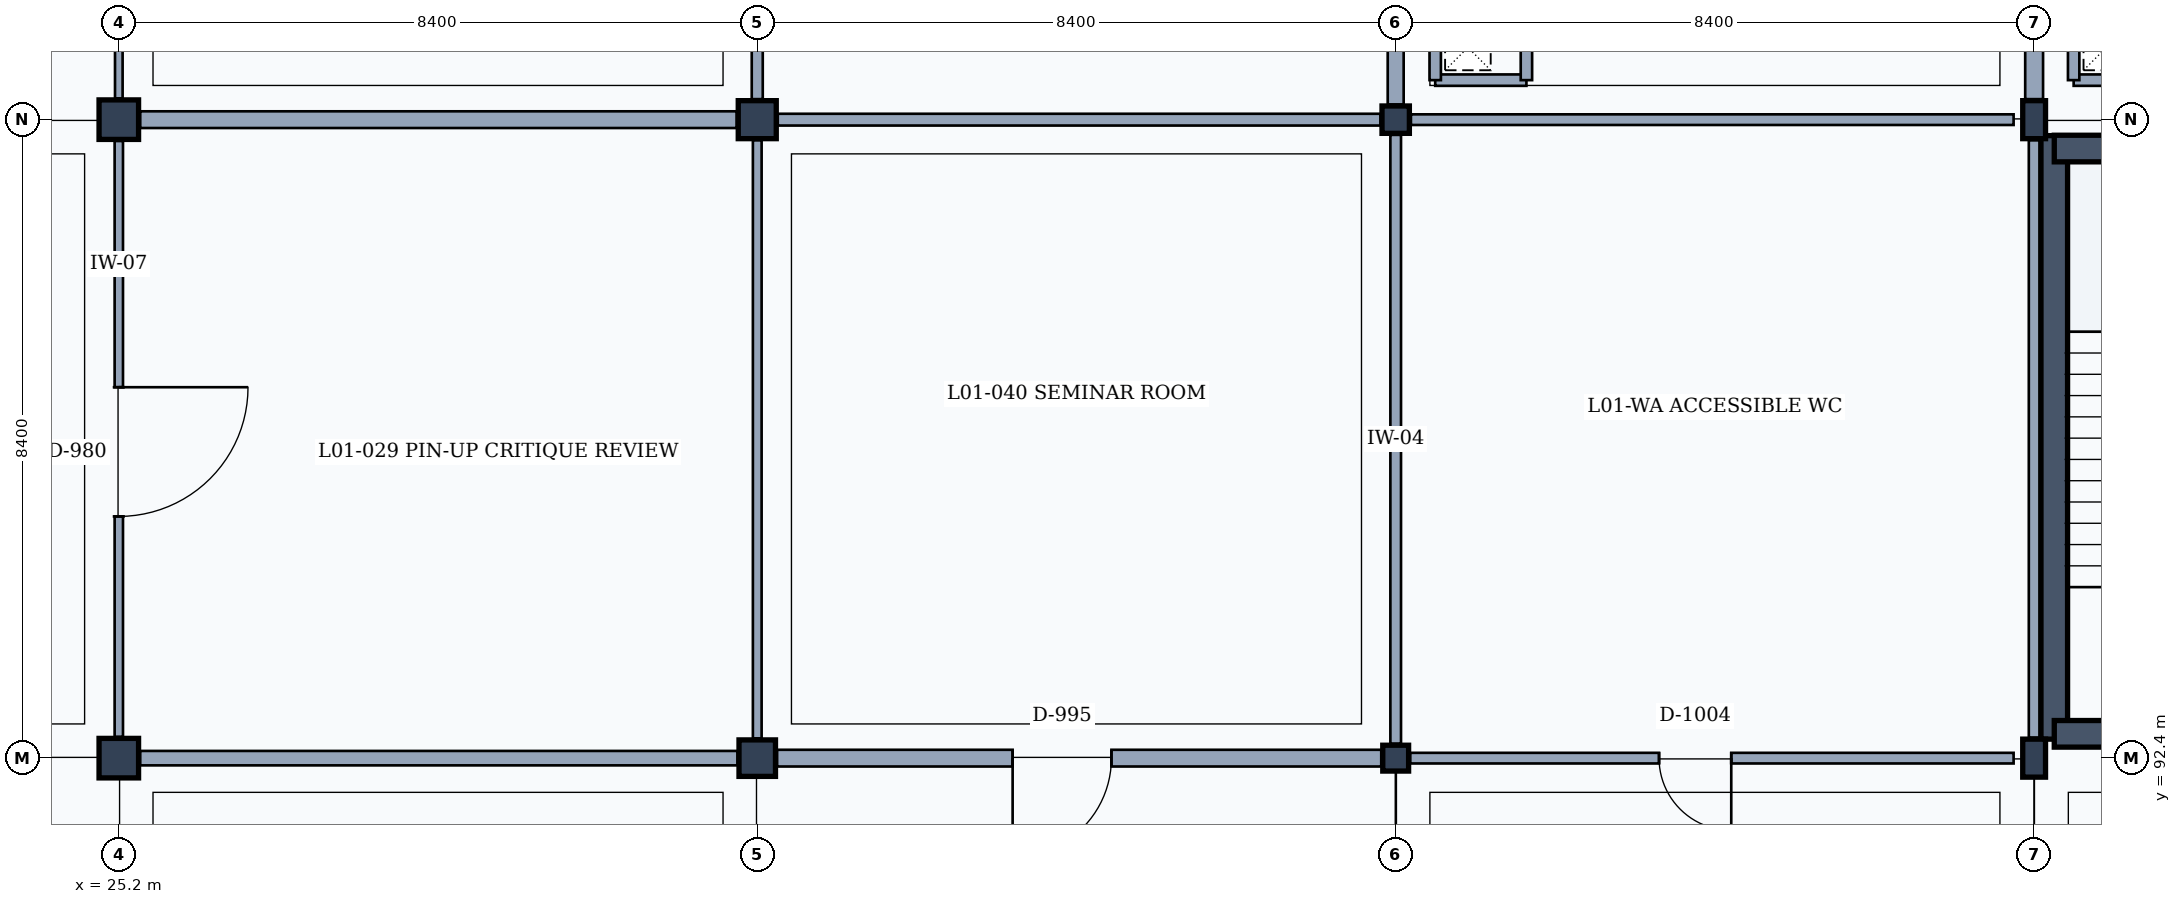
"""IFC4 building model, lengths in metres.
Left out: names, types, materials, properties, quantities, classifications, styles, units other than length and angle.
Written with IfcOpenShell. Run it as: python <this file> out.ifc"""

import sys

from ifc_helpers import new_model, si_unit, direction, frame, frame_2d, origin, origin_2d, place, context, subcontext, project, spatial, rectangle, i_section, extrude, element, fill, save


model = new_model("IFC4")
c1 = context("Model", 3, precision=1e-05, world=origin(), true_north=direction((0.0, 1.0)))
c2 = subcontext(c1, "Body", "Model", "MODEL_VIEW")
j1 = project(units=[si_unit("LENGTHUNIT", "METRE"), si_unit("PLANEANGLEUNIT", "RADIAN")], contexts=[c1])
p1 = place(None, origin())
s1 = spatial("IfcSite", under=j1, at=p1, CompositionType="ELEMENT")
p2 = place(p1, origin())
s2 = spatial("IfcBuilding", under=s1, at=p2, CompositionType="ELEMENT")
p3 = place(p2, frame((0.0, 0.0, 4.8)))
s3 = spatial("IfcBuildingStorey", under=s2, at=p3, CompositionType="ELEMENT", Elevation=4.8)
for number, where, z_axis, x_axis in (
    (1, (25.2, 92.4, 0.0), (0.0, 0.0, 1.0), (1.0, 0.0, 0.0)),
    (2, (25.2, 100.8, 0.0), (0.0, 0.0, 1.0), (1.0, 0.0, 0.0)),
):
    element("IfcColumn", number, at=place(p3, frame(where, z_axis=z_axis, x_axis=x_axis)), inside=s3, PredefinedType="COLUMN", context=c2, shape_type="SweptSolid", body=[
        extrude(rectangle(XDim=0.52, YDim=0.52, at=origin_2d()), origin(), (0.0, 0.0, 1.0), 4.8),
    ])
p4 = place(p3, frame((33.6, 92.4, 0.0), z_axis=(0.0, 0.0, 1.0), x_axis=(1.0, 0.0, 0.0)))
e3 = element("IfcColumn", 3, at=p4, inside=s3, PredefinedType="COLUMN", context=c2, shape_type="SweptSolid", body=[
    extrude(rectangle(XDim=0.48, YDim=0.48, at=origin_2d()), origin(), (0.0, 0.0, 1.0), 4.8),
])
p5 = place(p3, frame((33.6, 100.8, 0.0), z_axis=(0.0, 0.0, 1.0), x_axis=(1.0, 0.0, 0.0)))
e4 = element("IfcColumn", 4, at=p5, inside=s3, PredefinedType="COLUMN", context=c2, shape_type="SweptSolid", body=[
    extrude(rectangle(XDim=0.5, YDim=0.5, at=origin_2d()), origin(), (0.0, 0.0, 1.0), 4.8),
])
p6 = place(p3, frame((42.0, 92.4, 0.0), z_axis=(0.0, 0.0, 1.0), x_axis=(1.0, 0.0, 0.0)))
e5 = element("IfcColumn", 5, at=p6, inside=s3, PredefinedType="COLUMN", context=c2, shape_type="SweptSolid", body=[
    extrude(rectangle(XDim=0.34, YDim=0.34, at=origin_2d()), origin(), (0.0, 0.0, 1.0), 4.8),
])
p7 = place(p3, frame((42.0, 100.8, 0.0), z_axis=(0.0, 0.0, 1.0), x_axis=(1.0, 0.0, 0.0)))
e6 = element("IfcColumn", 6, at=p7, inside=s3, PredefinedType="COLUMN", context=c2, shape_type="SweptSolid", body=[
    extrude(rectangle(XDim=0.36, YDim=0.36, at=origin_2d()), origin(), (0.0, 0.0, 1.0), 4.8),
])
for number, where, z_axis, x_axis in (
    (7, (50.4, 92.4, 0.0), (0.0, 0.0, 1.0), (1.0, 0.0, 0.0)),
    (8, (50.4, 100.8, 0.0), (0.0, 0.0, 1.0), (1.0, 0.0, 0.0)),
):
    element("IfcColumn", number, at=place(p3, frame(where, z_axis=z_axis, x_axis=x_axis)), inside=s3, PredefinedType="COLUMN", context=c2, shape_type="SweptSolid", body=[
        extrude(i_section(OverallWidth=0.3, OverallDepth=0.5, WebThickness=0.014, FlangeThickness=0.028, FilletRadius=0.027, at=origin_2d()), origin(), (0.0, 0.0, 1.0), 4.8),
    ])
p8 = place(p3, frame((50.665, 92.65, 0.0), z_axis=(0.0, 0.0, 1.0), x_axis=(0.0, 1.0, 0.0)))
e9 = element("IfcWall", 9, at=p8, inside=s3, PredefinedType="SHEAR", context=c2, shape_type="SweptSolid", body=[
    extrude(rectangle(XDim=7.94, YDim=0.35, at=frame_2d((3.97, 0.0))), origin(), (0.0, 0.0, 1.0), 4.56),
])
p9 = place(p3, frame((50.665, 100.42, 0.0), z_axis=(0.0, 0.0, 1.0), x_axis=(1.0, 0.0, 0.0)))
e10 = element("IfcWall", 10, at=p9, inside=s3, PredefinedType="SHEAR", context=c2, shape_type="SweptSolid", body=[
    extrude(rectangle(XDim=7.875, YDim=0.35, at=frame_2d((3.938, 0.0))), origin(), (0.0, 0.0, 1.0), 4.56),
])
p10 = place(p3, frame((58.54, 92.72, 0.0), z_axis=(0.0, 0.0, 1.0), x_axis=(-1.0, 0.0, 0.0)))
e11 = element("IfcWall", 11, at=p10, inside=s3, PredefinedType="SHEAR", context=c2, shape_type="SweptSolid", body=[
    extrude(rectangle(XDim=7.875, YDim=0.35, at=frame_2d((3.938, 0.0))), origin(), (0.0, 0.0, 1.0), 4.56),
])
p11 = place(p10, frame((2.1, 0.0, 0.0)))
e12 = element("IfcOpeningElement", 12, at=p11, cuts=e11, PredefinedType="OPENING", context=c2, shape_type="SweptSolid", body=[
    extrude(rectangle(XDim=1.1, YDim=2.15, at=frame_2d((0.55, 1.075))), frame((0.0, 0.185, 0.0), z_axis=(0.0, -1.0, 0.0), x_axis=(1.0, 0.0, 0.0)), (0.0, 0.0, 1.0), 0.37),
])
for number, where, z_axis, x_axis in (
    (13, (42.52, 101.32, 0.0), (0.0, 0.0, 1.0), (1.0, 0.0, 0.0)),
    (14, (43.72, 101.32, 0.0), (0.0, 0.0, 1.0), (0.0, 1.0, 0.0)),
    (15, (42.52, 102.52, 0.0), (0.0, 0.0, 1.0), (0.0, -1.0, 0.0)),
):
    element("IfcWall", number, at=place(p3, frame(where, z_axis=z_axis, x_axis=x_axis)), inside=s3, PredefinedType="PARTITIONING", context=c2, shape_type="SweptSolid", body=[
        extrude(rectangle(XDim=1.2, YDim=0.15, at=frame_2d((0.6, 0.0))), origin(), (0.0, 0.0, 1.0), 4.53),
    ])
p12 = place(p3, frame((50.92, 101.32, 0.0), z_axis=(0.0, 0.0, 1.0), x_axis=(1.0, 0.0, 0.0)))
e16 = element("IfcWall", 16, at=p12, inside=s3, PredefinedType="PARTITIONING", context=c2, shape_type="SweptSolid", body=[
    extrude(rectangle(XDim=1.2, YDim=0.15, at=frame_2d((0.6, 0.0))), origin(), (0.0, 0.0, 1.0), 4.56),
])
p13 = place(p3, frame((50.92, 102.52, 0.0), z_axis=(0.0, 0.0, 1.0), x_axis=(0.0, -1.0, 0.0)))
e17 = element("IfcWall", 17, at=p13, inside=s3, PredefinedType="PARTITIONING", context=c2, shape_type="SweptSolid", body=[
    extrude(rectangle(XDim=1.2, YDim=0.15, at=frame_2d((0.6, 0.0))), origin(), (0.0, 0.0, 1.0), 4.56),
])
p14 = place(p3, frame((25.2, 92.68, 0.0), z_axis=(0.0, 0.0, 1.0), x_axis=(0.0, 1.0, 0.0)))
e18 = element("IfcWall", 18, at=p14, inside=s3, PredefinedType="PARTITIONING", context=c2, shape_type="SweptSolid", body=[
    extrude(rectangle(XDim=7.84, YDim=0.11, at=frame_2d((3.92, 0.0))), origin(), (0.0, 0.0, 1.0), 3.92),
])
p15 = place(p14, frame((2.9, 0.0, 0.0)))
e19 = element("IfcOpeningElement", 19, at=p15, cuts=e18, PredefinedType="OPENING", context=c2, shape_type="SweptSolid", body=[
    extrude(rectangle(XDim=1.7, YDim=2.3, at=frame_2d((0.85, 1.15))), frame((0.0, 0.065, 0.0), z_axis=(0.0, -1.0, 0.0), x_axis=(1.0, 0.0, 0.0)), (0.0, 0.0, 1.0), 0.13),
])
p16 = place(p3, frame((25.2, 101.08, 0.0), z_axis=(0.0, 0.0, 1.0), x_axis=(0.0, 1.0, 0.0)))
e20 = element("IfcWall", 20, at=p16, inside=s3, PredefinedType="MOVABLE", context=c2, shape_type="SweptSolid", body=[
    extrude(rectangle(XDim=7.84, YDim=0.1, at=frame_2d((3.92, 0.0))), origin(), (0.0, 0.0, 1.0), 3.92),
])
p17 = place(p16, frame((2.8, 0.0, 0.0)))
e21 = element("IfcOpeningElement", 21, at=p17, cuts=e20, PredefinedType="OPENING", context=c2, shape_type="SweptSolid", body=[
    extrude(rectangle(XDim=1.9, YDim=2.4, at=frame_2d((0.95, 1.2))), frame((0.0, 0.06, 0.0), z_axis=(0.0, -1.0, 0.0), x_axis=(1.0, 0.0, 0.0)), (0.0, 0.0, 1.0), 0.12),
])
p18 = place(p3, frame((25.48, 92.4, 0.0), z_axis=(0.0, 0.0, 1.0), x_axis=(1.0, 0.0, 0.0)))
e22 = element("IfcWall", 22, at=p18, inside=s3, PredefinedType="PARTITIONING", context=c2, shape_type="SweptSolid", body=[
    extrude(rectangle(XDim=7.86, YDim=0.19, at=frame_2d((3.93, 0.0))), origin(), (0.0, 0.0, 1.0), 3.89),
])
p19 = place(p3, frame((33.6, 92.66, 0.0), z_axis=(0.0, 0.0, 1.0), x_axis=(0.0, 1.0, 0.0)))
e23 = element("IfcWall", 23, at=p19, inside=s3, PredefinedType="PARTITIONING", context=c2, shape_type="SweptSolid", body=[
    extrude(rectangle(XDim=7.87, YDim=0.115, at=frame_2d((3.935, 0.0))), origin(), (0.0, 0.0, 1.0), 3.92),
])
p20 = place(p3, frame((25.48, 100.8, 0.0), z_axis=(0.0, 0.0, 1.0), x_axis=(1.0, 0.0, 0.0)))
e24 = element("IfcWall", 24, at=p20, inside=s3, PredefinedType="PARTITIONING", context=c2, shape_type="SweptSolid", body=[
    extrude(rectangle(XDim=7.85, YDim=0.22, at=frame_2d((3.925, 0.0))), origin(), (0.0, 0.0, 1.0), 3.89),
])
p21 = place(p3, frame((33.6, 101.07, 0.0), z_axis=(0.0, 0.0, 1.0), x_axis=(0.0, 1.0, 0.0)))
e25 = element("IfcWall", 25, at=p21, inside=s3, PredefinedType="PARTITIONING", context=c2, shape_type="SweptSolid", body=[
    extrude(rectangle(XDim=7.87, YDim=0.145, at=frame_2d((3.935, 0.0))), origin(), (0.0, 0.0, 1.0), 3.92),
])
p22 = place(p21, frame((3.05, 0.0, 0.0)))
e26 = element("IfcOpeningElement", 26, at=p22, cuts=e25, PredefinedType="OPENING", context=c2, shape_type="SweptSolid", body=[
    extrude(rectangle(XDim=1.4, YDim=2.25, at=frame_2d((0.7, 1.125))), frame((0.0, 0.083, 0.0), z_axis=(0.0, -1.0, 0.0), x_axis=(1.0, 0.0, 0.0)), (0.0, 0.0, 1.0), 0.165),
])
p23 = place(p3, frame((33.86, 92.4, 0.0), z_axis=(0.0, 0.0, 1.0), x_axis=(1.0, 0.0, 0.0)))
e27 = element("IfcWall", 27, at=p23, inside=s3, PredefinedType="PARTITIONING", context=c2, shape_type="SweptSolid", body=[
    extrude(rectangle(XDim=7.95, YDim=0.22, at=frame_2d((3.975, 0.0))), origin(), (0.0, 0.0, 1.0), 3.89),
])
p24 = place(p23, frame((3.1, 0.0, 0.0)))
e28 = element("IfcOpeningElement", 28, at=p24, cuts=e27, PredefinedType="OPENING", context=c2, shape_type="SweptSolid", body=[
    extrude(rectangle(XDim=1.3, YDim=2.2, at=frame_2d((0.65, 1.1))), frame((0.0, 0.12, 0.0), z_axis=(0.0, -1.0, 0.0), x_axis=(1.0, 0.0, 0.0)), (0.0, 0.0, 1.0), 0.24),
])
p25 = place(p3, frame((42.0, 92.59, 0.0), z_axis=(0.0, 0.0, 1.0), x_axis=(0.0, 1.0, 0.0)))
e29 = element("IfcWall", 29, at=p25, inside=s3, PredefinedType="PARTITIONING", context=c2, shape_type="SweptSolid", body=[
    extrude(rectangle(XDim=8.01, YDim=0.14, at=frame_2d((4.005, 0.0))), origin(), (0.0, 0.0, 1.0), 3.92),
])
p26 = place(p3, frame((33.87, 100.8, 0.0), z_axis=(0.0, 0.0, 1.0), x_axis=(1.0, 0.0, 0.0)))
e30 = element("IfcWall", 30, at=p26, inside=s3, PredefinedType="PARTITIONING", context=c2, shape_type="SweptSolid", body=[
    extrude(rectangle(XDim=7.93, YDim=0.155, at=frame_2d((3.965, 0.0))), origin(), (0.0, 0.0, 1.0), 3.89),
])
p27 = place(p3, frame((42.0, 101.0, 0.0), z_axis=(0.0, 0.0, 1.0), x_axis=(0.0, 1.0, 0.0)))
e31 = element("IfcWall", 31, at=p27, inside=s3, PredefinedType="PARTITIONING", context=c2, shape_type="SweptSolid", body=[
    extrude(rectangle(XDim=8.01, YDim=0.21, at=frame_2d((4.005, 0.0))), origin(), (0.0, 0.0, 1.0), 3.92),
])
p28 = place(p27, frame((2.975, 0.0, 0.0)))
e32 = element("IfcOpeningElement", 32, at=p28, cuts=e31, PredefinedType="OPENING", context=c2, shape_type="SweptSolid", body=[
    extrude(rectangle(XDim=1.55, YDim=2.35, at=frame_2d((0.775, 1.175))), frame((0.0, 0.115, 0.0), z_axis=(0.0, -1.0, 0.0), x_axis=(1.0, 0.0, 0.0)), (0.0, 0.0, 1.0), 0.23),
])
p29 = place(p3, frame((42.19, 92.4, 0.0), z_axis=(0.0, 0.0, 1.0), x_axis=(1.0, 0.0, 0.0)))
e33 = element("IfcWall", 33, at=p29, inside=s3, PredefinedType="PARTITIONING", context=c2, shape_type="SweptSolid", body=[
    extrude(rectangle(XDim=7.94, YDim=0.14, at=frame_2d((3.97, 0.0))), origin(), (0.0, 0.0, 1.0), 3.89),
])
p30 = place(p29, frame((3.275, 0.0, 0.0)))
e34 = element("IfcOpeningElement", 34, at=p30, cuts=e33, PredefinedType="OPENING", context=c2, shape_type="SweptSolid", body=[
    extrude(rectangle(XDim=0.95, YDim=2.15, at=frame_2d((0.475, 1.075))), frame((0.0, 0.08, 0.0), z_axis=(0.0, -1.0, 0.0), x_axis=(1.0, 0.0, 0.0)), (0.0, 0.0, 1.0), 0.16),
])
p31 = place(p3, frame((50.4, 92.67, 0.0), z_axis=(0.0, 0.0, 1.0), x_axis=(0.0, 1.0, 0.0)))
e35 = element("IfcWall", 35, at=p31, inside=s3, PredefinedType="PARTITIONING", context=c2, shape_type="SweptSolid", body=[
    extrude(rectangle(XDim=7.86, YDim=0.14, at=frame_2d((3.93, 0.0))), origin(), (0.0, 0.0, 1.0), 3.92),
])
p32 = place(p3, frame((42.2, 100.8, 0.0), z_axis=(0.0, 0.0, 1.0), x_axis=(1.0, 0.0, 0.0)))
e36 = element("IfcWall", 36, at=p32, inside=s3, PredefinedType="PARTITIONING", context=c2, shape_type="SweptSolid", body=[
    extrude(rectangle(XDim=7.93, YDim=0.14, at=frame_2d((3.965, 0.0))), origin(), (0.0, 0.0, 1.0), 3.89),
])
p33 = place(p3, frame((50.4, 101.07, 0.0), z_axis=(0.0, 0.0, 1.0), x_axis=(0.0, 1.0, 0.0)))
e37 = element("IfcWall", 37, at=p33, inside=s3, PredefinedType="PARTITIONING", context=c2, shape_type="SweptSolid", body=[
    extrude(rectangle(XDim=7.86, YDim=0.235, at=frame_2d((3.93, 0.0))), origin(), (0.0, 0.0, 1.0), 3.92),
])
p34 = place(p33, frame((2.85, 0.0, 0.0)))
e38 = element("IfcOpeningElement", 38, at=p34, cuts=e37, PredefinedType="OPENING", context=c2, shape_type="SweptSolid", body=[
    extrude(rectangle(XDim=1.8, YDim=2.3, at=frame_2d((0.9, 1.15))), frame((0.0, 0.127, 0.0), z_axis=(0.0, -1.0, 0.0), x_axis=(1.0, 0.0, 0.0)), (0.0, 0.0, 1.0), 0.255),
])
p35 = place(p15, frame((1.7, 0.0, 0.0), z_axis=(0.0, 0.0, 1.0), x_axis=(-1.0, 0.0, 0.0)))
e39 = element("IfcDoor", 39, at=p35, inside=s3, OperationType="SINGLE_SWING_LEFT", PredefinedType="DOOR", context=c2, shape_type="SweptSolid", body=[
    extrude(rectangle(XDim=1.7, YDim=2.3, at=frame_2d((0.85, 1.15))), frame((0.0, 0.025, 0.0), z_axis=(0.0, -1.0, 0.0), x_axis=(1.0, 0.0, 0.0)), (0.0, 0.0, 1.0), 0.05),
])
fill(e19, e39)
p36 = place(p24, frame((1.3, 0.0, 0.0), z_axis=(0.0, 0.0, 1.0), x_axis=(-1.0, 0.0, 0.0)))
e40 = element("IfcDoor", 40, at=p36, inside=s3, OperationType="SINGLE_SWING_RIGHT", PredefinedType="DOOR", context=c2, shape_type="SweptSolid", body=[
    extrude(rectangle(XDim=1.3, YDim=2.2, at=frame_2d((0.65, 1.1))), frame((0.0, 0.025, 0.0), z_axis=(0.0, -1.0, 0.0), x_axis=(1.0, 0.0, 0.0)), (0.0, 0.0, 1.0), 0.05),
])
fill(e28, e40)
p37 = place(p30, frame((0.95, 0.0, 0.0), z_axis=(0.0, 0.0, 1.0), x_axis=(-1.0, 0.0, 0.0)))
e41 = element("IfcDoor", 41, at=p37, inside=s3, OperationType="SINGLE_SWING_LEFT", PredefinedType="DOOR", context=c2, shape_type="SweptSolid", body=[
    extrude(rectangle(XDim=0.95, YDim=2.15, at=frame_2d((0.475, 1.075))), frame((0.0, 0.025, 0.0), z_axis=(0.0, -1.0, 0.0), x_axis=(1.0, 0.0, 0.0)), (0.0, 0.0, 1.0), 0.05),
])
fill(e34, e41)
save(model, sys.argv[1])
